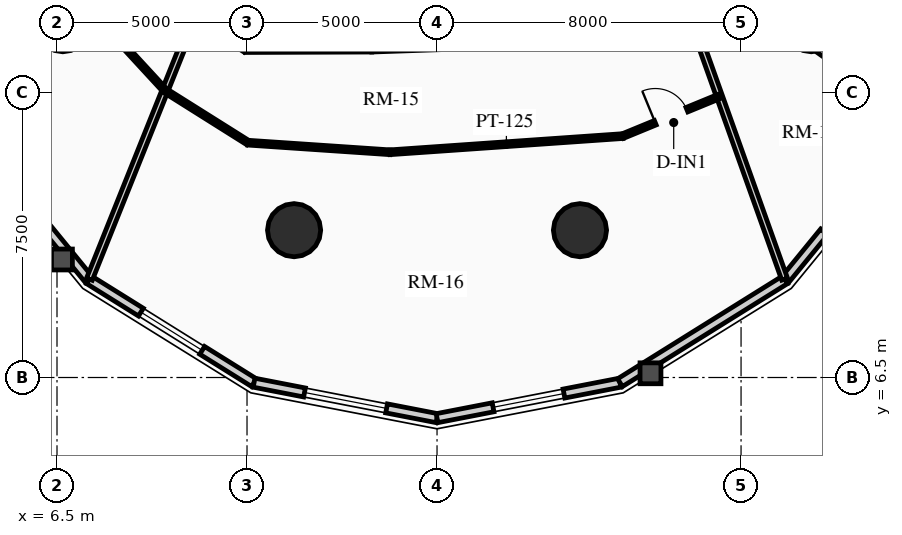
"""IFC4 building model, lengths in metres.
Left out: names, types, materials, properties, quantities, classifications, styles, units other than length and angle.
Written with IfcOpenShell. Run it as: python <this file> out.ifc"""

import sys

from ifc_helpers import new_model, si_unit, direction, frame, frame_2d, origin, origin_2d, place, context, subcontext, project, spatial, rectangle, circle, extrude, source, transform, mapped, element, fill, save


model = new_model("IFC4")
c1 = context("Model", 3, precision=1e-05, world=origin(), true_north=direction((0.0, 1.0)))
c2 = subcontext(c1, "Body", "Model", "MODEL_VIEW")
j1 = project(units=[si_unit("LENGTHUNIT", "METRE"), si_unit("PLANEANGLEUNIT", "RADIAN")], contexts=[c1])
p1 = place(None, origin())
s1 = spatial("IfcSite", under=j1, at=p1, CompositionType="ELEMENT")
p2 = place(p1, origin())
s2 = spatial("IfcBuilding", under=s1, at=p2, CompositionType="ELEMENT")
p3 = place(p2, frame((0.0, 0.0, 107.98)))
s3 = spatial("IfcBuildingStorey", under=s2, at=p3, CompositionType="ELEMENT", Elevation=107.98)
for number, where, z_axis, x_axis in (
    (1, (12.739, 10.377, 0.0), (0.0, 0.0, 1.0), (1.0, 0.0, 0.0)),
    (2, (20.261, 10.377, 0.0), (0.0, 0.0, 1.0), (1.0, 0.0, 0.0)),
):
    element("IfcColumn", number, at=place(p3, frame(where, z_axis=z_axis, x_axis=x_axis)), inside=s3, PredefinedType="USERDEFINED", context=c2, shape_type="SweptSolid", body=[
        extrude(circle(Radius=0.7, at=origin_2d()), origin(), (0.0, 0.0, 1.0), 2.91),
    ])
p4 = place(p3, frame((7.342, 9.072, 0.0), z_axis=(0.0, 0.0, 1.0), x_axis=(-0.632700781152, 0.77439635945, 0.0)))
e3 = element("IfcWall", 3, at=p4, inside=s3, PredefinedType="SOLIDWALL", context=c2, shape_type="SweptSolid", body=[
    extrude(rectangle(XDim=5.448, YDim=0.24, at=frame_2d((2.724, 0.0))), origin(), (0.0, 0.0, 1.0), 2.179),
])
p5 = place(p3, frame((11.685, 6.363, 0.0), z_axis=(0.0, 0.0, 1.0), x_axis=(-0.848520380187, 0.529162701263, 0.0)))
e4 = element("IfcWall", 4, at=p5, inside=s3, PredefinedType="SOLIDWALL", context=c2, shape_type="SweptSolid", body=[
    extrude(rectangle(XDim=5.119, YDim=0.24, at=frame_2d((2.56, 0.0))), origin(), (0.0, 0.0, 1.0), 2.179),
])
m1 = source(origin(), c2, "Body", "SweptSolid", [
    extrude(rectangle(XDim=1.9, YDim=1.35, at=frame_2d((0.95, 0.675))), frame((0.0, 0.13, 0.0), z_axis=(0.0, -1.0, 0.0), x_axis=(1.0, 0.0, 0.0)), (0.0, 0.0, 1.0), 0.26),
])
p6 = place(p5, frame((1.609, 0.0, 0.65)))
e5 = element("IfcOpeningElement", 5, at=p6, cuts=e4, PredefinedType="OPENING", context=c2, shape_type="MappedRepresentation", body=[
    mapped(m1, transform((0.0, 0.0, 0.0), x_axis=(1.0, 0.0, 0.0), y_axis=(0.0, 1.0, 0.0), z_axis=(0.0, 0.0, 1.0), scale=1.0)),
])
p7 = place(p3, frame((16.5, 5.43, 0.0), z_axis=(0.0, 0.0, 1.0), x_axis=(-0.981723785992, 0.190311344954, 0.0)))
e6 = element("IfcWall", 6, at=p7, inside=s3, PredefinedType="SOLIDWALL", context=c2, shape_type="SweptSolid", body=[
    extrude(rectangle(XDim=4.904, YDim=0.24, at=frame_2d((2.452, 0.0))), origin(), (0.0, 0.0, 1.0), 2.179),
])
m2 = source(origin(), c2, "Body", "SweptSolid", [
    extrude(rectangle(XDim=2.2, YDim=1.35, at=frame_2d((1.1, 0.675))), frame((0.0, 0.13, 0.0), z_axis=(0.0, -1.0, 0.0), x_axis=(1.0, 0.0, 0.0)), (0.0, 0.0, 1.0), 0.26),
])
p8 = place(p7, frame((1.352, 0.0, 0.65)))
e7 = element("IfcOpeningElement", 7, at=p8, cuts=e6, PredefinedType="OPENING", context=c2, shape_type="MappedRepresentation", body=[
    mapped(m2, transform((0.0, 0.0, 0.0), x_axis=(1.0, 0.0, 0.0), y_axis=(0.0, 1.0, 0.0), z_axis=(0.0, 0.0, 1.0), scale=1.0)),
])
p9 = place(p3, frame((21.315, 6.363, 0.0), z_axis=(0.0, 0.0, 1.0), x_axis=(-0.981723785992, -0.190311344954, 0.0)))
e8 = element("IfcWall", 8, at=p9, inside=s3, PredefinedType="SOLIDWALL", context=c2, shape_type="SweptSolid", body=[
    extrude(rectangle(XDim=4.904, YDim=0.24, at=frame_2d((2.452, 0.0))), origin(), (0.0, 0.0, 1.0), 2.179),
])
p10 = place(p9, frame((1.502, 0.0, 0.65)))
e9 = element("IfcOpeningElement", 9, at=p10, cuts=e8, PredefinedType="OPENING", context=c2, shape_type="MappedRepresentation", body=[
    mapped(m1, transform((0.0, 0.0, 0.0), x_axis=(1.0, 0.0, 0.0), y_axis=(0.0, 1.0, 0.0), z_axis=(0.0, 0.0, 1.0), scale=1.0)),
])
p11 = place(p3, frame((25.658, 9.072, 0.0), z_axis=(0.0, 0.0, 1.0), x_axis=(-0.848520380187, -0.529162701263, 0.0)))
e10 = element("IfcWall", 10, at=p11, inside=s3, PredefinedType="SOLIDWALL", context=c2, shape_type="SweptSolid", body=[
    extrude(rectangle(XDim=5.119, YDim=0.24, at=frame_2d((2.56, 0.0))), origin(), (0.0, 0.0, 1.0), 2.179),
])
p12 = place(p3, frame((29.105, 13.291, 0.0), z_axis=(0.0, 0.0, 1.0), x_axis=(-0.632700781152, -0.77439635945, 0.0)))
e11 = element("IfcWall", 11, at=p12, inside=s3, PredefinedType="SOLIDWALL", context=c2, shape_type="SweptSolid", body=[
    extrude(rectangle(XDim=5.448, YDim=0.24, at=frame_2d((2.724, 0.0))), origin(), (0.0, 0.0, 1.0), 2.179),
])
p13 = place(p12, frame((1.624, 0.0, 0.65)))
e12 = element("IfcOpeningElement", 12, at=p13, cuts=e11, PredefinedType="OPENING", context=c2, shape_type="MappedRepresentation", body=[
    mapped(m2, transform((0.0, 0.0, 0.0), x_axis=(1.0, 0.0, 0.0), y_axis=(0.0, 1.0, 0.0), z_axis=(0.0, 0.0, 1.0), scale=1.0)),
])
p14 = place(p3, frame((10.115, 15.983, 0.0), z_axis=(0.0, 0.0, 1.0), x_axis=(-0.371861013147, -0.928288417951, 0.0)))
e13 = element("IfcWall", 13, at=p14, inside=s3, PredefinedType="PARTITIONING", context=c2, shape_type="SweptSolid", body=[
    extrude(rectangle(XDim=7.427, YDim=0.16, at=frame_2d((3.714, 0.0))), origin(), (0.0, 0.0, 1.0), 2.179),
])
p15 = place(p3, frame((23.263, 15.77, 0.0), z_axis=(0.0, 0.0, 1.0), x_axis=(0.335919964206, -0.941890533793, 0.0)))
e14 = element("IfcWall", 14, at=p15, inside=s3, PredefinedType="PARTITIONING", context=c2, shape_type="SweptSolid", body=[
    extrude(rectangle(XDim=7.094, YDim=0.16, at=frame_2d((3.547, 0.0))), origin(), (0.0, 0.0, 1.0), 2.179),
])
p16 = place(p3, frame((24.052, 16.905, 0.0), z_axis=(0.0, 0.0, 1.0), x_axis=(0.813437670746, -0.581652091727, 0.0)))
e15 = element("IfcWall", 15, at=p16, inside=s3, PredefinedType="PARTITIONING", context=c2, shape_type="SweptSolid", body=[
    extrude(rectangle(XDim=6.192, YDim=0.16, at=frame_2d((3.096, 0.0))), origin(), (0.0, 0.0, 1.0), 2.179),
])
p17 = place(p3, frame((7.583, 15.961, 0.0), z_axis=(0.0, 0.0, 1.0), x_axis=(0.677838563189, -0.735210774032, 0.0)))
e16 = element("IfcWall", 16, at=p17, inside=s3, PredefinedType="PARTITIONING", context=c2, shape_type="SweptSolid", body=[
    extrude(rectangle(XDim=2.596, YDim=0.125, at=frame_2d((1.298, 0.0))), origin(), (0.0, 0.0, 1.0), 2.655),
])
p18 = place(p3, frame((9.342, 14.052, 0.0), z_axis=(0.0, 0.0, 1.0), x_axis=(0.846526826244, -0.532346064557, 0.0)))
e17 = element("IfcWall", 17, at=p18, inside=s3, PredefinedType="PARTITIONING", context=c2, shape_type="SweptSolid", body=[
    extrude(rectangle(XDim=2.578, YDim=0.125, at=frame_2d((1.289, 0.0))), origin(), (0.0, 0.0, 1.0), 2.225),
])
p19 = place(p3, frame((11.525, 12.68, 0.0), z_axis=(0.0, 0.0, 1.0), x_axis=(0.997726815836, -0.067388433443, 0.0)))
e18 = element("IfcWall", 18, at=p19, inside=s3, PredefinedType="PARTITIONING", context=c2, shape_type="SweptSolid", body=[
    extrude(rectangle(XDim=3.746, YDim=0.125, at=frame_2d((1.873, 0.0))), origin(), (0.0, 0.0, 1.0), 2.225),
])
p20 = place(p3, frame((15.262, 12.427, 0.0), z_axis=(0.0, 0.0, 1.0), x_axis=(0.997595855995, 0.069300130605, 0.0)))
e19 = element("IfcWall", 19, at=p20, inside=s3, PredefinedType="PARTITIONING", context=c2, shape_type="SweptSolid", body=[
    extrude(rectangle(XDim=6.14, YDim=0.125, at=frame_2d((3.07, 0.0))), origin(), (0.0, 0.0, 1.0), 2.225),
])
p21 = place(p3, frame((21.388, 12.853, 0.0), z_axis=(0.0, 0.0, 1.0), x_axis=(0.924757149715, 0.380557767036, 0.0)))
e20 = element("IfcWall", 20, at=p21, inside=s3, PredefinedType="PARTITIONING", context=c2, shape_type="SweptSolid", body=[
    extrude(rectangle(XDim=2.75, YDim=0.125, at=frame_2d((1.375, 0.0))), origin(), (0.0, 0.0, 1.0), 2.179),
])
m3 = source(origin(), c2, "Body", "SweptSolid", [
    extrude(rectangle(XDim=0.9, YDim=2.005, at=frame_2d((0.45, 1.002))), frame((0.0, 0.073, 0.0), z_axis=(0.0, -1.0, 0.0), x_axis=(1.0, 0.0, 0.0)), (0.0, 0.0, 1.0), 0.145),
])
p22 = place(p21, frame((0.925, 0.0, 0.0)))
e21 = element("IfcOpeningElement", 21, at=p22, cuts=e20, PredefinedType="OPENING", context=c2, shape_type="MappedRepresentation", body=[
    mapped(m3, transform((0.0, 0.0, 0.0), x_axis=(1.0, 0.0, 0.0), y_axis=(0.0, 1.0, 0.0), z_axis=(0.0, 0.0, 1.0), scale=1.0)),
])
m4 = source(origin(), c2, "Body", "SweptSolid", [
    extrude(rectangle(XDim=1.9, YDim=1.35, at=frame_2d((0.95, 0.675))), frame((0.0, 0.03, 0.0), z_axis=(0.0, -1.0, 0.0), x_axis=(1.0, 0.0, 0.0)), (0.0, 0.0, 1.0), 0.06),
])
p23 = place(p6, origin())
e22 = element("IfcWindow", 22, at=p23, inside=s3, PartitioningType="DOUBLE_PANEL_VERTICAL", PredefinedType="WINDOW", context=c2, shape_type="MappedRepresentation", body=[
    mapped(m4, transform((0.0, 0.0, 0.0), x_axis=(1.0, 0.0, 0.0), y_axis=(0.0, 1.0, 0.0), z_axis=(0.0, 0.0, 1.0), scale=1.0)),
])
fill(e5, e22)
m5 = source(origin(), c2, "Body", "SweptSolid", [
    extrude(rectangle(XDim=2.2, YDim=1.35, at=frame_2d((1.1, 0.675))), frame((0.0, 0.03, 0.0), z_axis=(0.0, -1.0, 0.0), x_axis=(1.0, 0.0, 0.0)), (0.0, 0.0, 1.0), 0.06),
])
p24 = place(p8, origin())
e23 = element("IfcWindow", 23, at=p24, inside=s3, PartitioningType="DOUBLE_PANEL_VERTICAL", PredefinedType="WINDOW", context=c2, shape_type="MappedRepresentation", body=[
    mapped(m5, transform((0.0, 0.0, 0.0), x_axis=(1.0, 0.0, 0.0), y_axis=(0.0, 1.0, 0.0), z_axis=(0.0, 0.0, 1.0), scale=1.0)),
])
fill(e7, e23)
p25 = place(p10, origin())
e24 = element("IfcWindow", 24, at=p25, inside=s3, PartitioningType="DOUBLE_PANEL_VERTICAL", PredefinedType="WINDOW", context=c2, shape_type="MappedRepresentation", body=[
    mapped(m4, transform((0.0, 0.0, 0.0), x_axis=(1.0, 0.0, 0.0), y_axis=(0.0, 1.0, 0.0), z_axis=(0.0, 0.0, 1.0), scale=1.0)),
])
fill(e9, e24)
m6 = source(origin(), c2, "Body", "SweptSolid", [
    extrude(rectangle(XDim=0.9, YDim=2.005, at=frame_2d((0.45, 1.002))), frame((0.0, 0.025, 0.0), z_axis=(0.0, -1.0, 0.0), x_axis=(1.0, 0.0, 0.0)), (0.0, 0.0, 1.0), 0.05),
])
p26 = place(p22, origin())
e25 = element("IfcDoor", 25, at=p26, inside=s3, OperationType="SINGLE_SWING_LEFT", PredefinedType="DOOR", context=c2, shape_type="MappedRepresentation", body=[
    mapped(m6, transform((0.0, 0.0, 0.0), x_axis=(1.0, 0.0, 0.0), y_axis=(0.0, 1.0, 0.0), z_axis=(0.0, 0.0, 1.0), scale=1.0)),
])
fill(e21, e25)
save(model, sys.argv[1])
